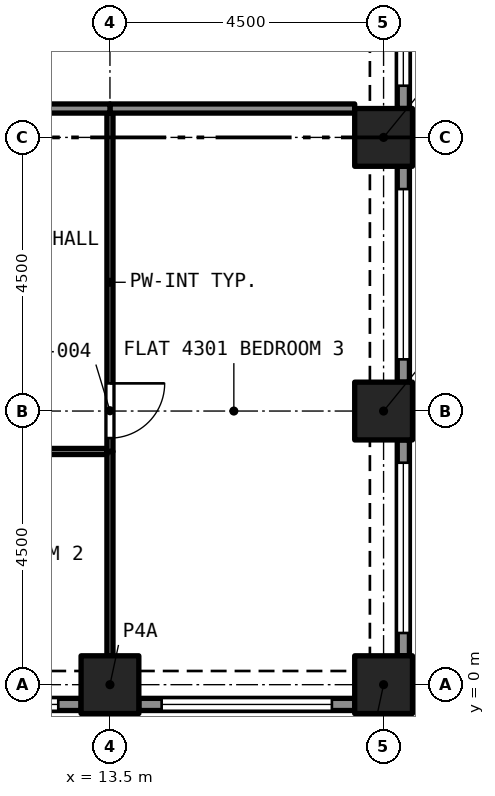
"""IFC4 building model, lengths in metres.
Left out: names, types, materials, properties, quantities, classifications, styles, units other than length and angle.
Written with IfcOpenShell. Run it as: python <this file> out.ifc"""

import sys

from ifc_helpers import new_model, si_unit, direction, frame, frame_2d, origin, origin_2d, place, context, subcontext, project, spatial, rectangle, extrude, element, fill, save


model = new_model("IFC4")
c1 = context("Model", 3, precision=1e-05, world=origin(), true_north=direction((0.0, 1.0)))
c2 = subcontext(c1, "Body", "Model", "MODEL_VIEW")
j1 = project(units=[si_unit("LENGTHUNIT", "METRE"), si_unit("PLANEANGLEUNIT", "RADIAN")], contexts=[c1])
p1 = place(None, origin())
s1 = spatial("IfcSite", under=j1, at=p1, CompositionType="ELEMENT")
p2 = place(p1, origin())
s2 = spatial("IfcBuilding", under=s1, at=p2, CompositionType="ELEMENT")
p3 = place(p2, frame((0.0, 0.0, 155.0)))
s3 = spatial("IfcBuildingStorey", under=s2, at=p3, CompositionType="ELEMENT", Elevation=155.0)
for number, where, z_axis, x_axis in (
    (1, (13.5, 0.0, 0.0), (0.0, 0.0, 1.0), (1.0, 0.0, 0.0)),
    (2, (18.0, 0.0, 0.0), (0.0, 0.0, 1.0), (1.0, 0.0, 0.0)),
    (3, (18.0, 4.5, 0.0), (0.0, 0.0, 1.0), (1.0, 0.0, 0.0)),
    (4, (18.0, 9.0, 0.0), (0.0, 0.0, 1.0), (1.0, 0.0, 0.0)),
):
    element("IfcColumn", number, at=place(p3, frame(where, z_axis=z_axis, x_axis=x_axis)), inside=s3, PredefinedType="COLUMN", context=c2, shape_type="SweptSolid", body=[
        extrude(rectangle(XDim=0.95, YDim=0.95, at=origin_2d()), origin(), (0.0, 0.0, 1.0), 4.4),
    ])
p4 = place(p3, frame((13.025, -0.325, 0.0), z_axis=(0.0, 0.0, 1.0), x_axis=(-1.0, 0.0, 0.0)))
e5 = element("IfcWall", 5, at=p4, inside=s3, PredefinedType="SOLIDWALL", context=c2, shape_type="SweptSolid", body=[
    extrude(rectangle(XDim=3.55, YDim=0.2, at=frame_2d((1.775, 0.0))), origin(), (0.0, 0.0, 1.0), 4.4),
])
p5 = place(p4, frame((0.375, 0.0, 0.45)))
e6 = element("IfcOpeningElement", 6, at=p5, cuts=e5, PredefinedType="OPENING", context=c2, shape_type="SweptSolid", body=[
    extrude(rectangle(XDim=2.8, YDim=2.55, at=frame_2d((1.4, 1.275))), frame((0.0, 0.11, 0.0), z_axis=(0.0, -1.0, 0.0), x_axis=(1.0, 0.0, 0.0)), (0.0, 0.0, 1.0), 0.22),
])
p6 = place(p3, frame((17.525, -0.325, 0.0), z_axis=(0.0, 0.0, 1.0), x_axis=(-1.0, 0.0, 0.0)))
e7 = element("IfcWall", 7, at=p6, inside=s3, PredefinedType="SOLIDWALL", context=c2, shape_type="SweptSolid", body=[
    extrude(rectangle(XDim=3.55, YDim=0.2, at=frame_2d((1.775, 0.0))), origin(), (0.0, 0.0, 1.0), 4.4),
])
p7 = place(p6, frame((0.375, 0.0, 0.45)))
e8 = element("IfcOpeningElement", 8, at=p7, cuts=e7, PredefinedType="OPENING", context=c2, shape_type="SweptSolid", body=[
    extrude(rectangle(XDim=2.8, YDim=2.55, at=frame_2d((1.4, 1.275))), frame((0.0, 0.11, 0.0), z_axis=(0.0, -1.0, 0.0), x_axis=(1.0, 0.0, 0.0)), (0.0, 0.0, 1.0), 0.22),
])
p8 = place(p3, frame((18.325, 4.025, 0.0), z_axis=(0.0, 0.0, 1.0), x_axis=(0.0, -1.0, 0.0)))
e9 = element("IfcWall", 9, at=p8, inside=s3, PredefinedType="SOLIDWALL", context=c2, shape_type="SweptSolid", body=[
    extrude(rectangle(XDim=3.55, YDim=0.2, at=frame_2d((1.775, 0.0))), origin(), (0.0, 0.0, 1.0), 4.4),
])
p9 = place(p8, frame((0.375, 0.0, 0.45)))
e10 = element("IfcOpeningElement", 10, at=p9, cuts=e9, PredefinedType="OPENING", context=c2, shape_type="SweptSolid", body=[
    extrude(rectangle(XDim=2.8, YDim=2.55, at=frame_2d((1.4, 1.275))), frame((0.0, 0.11, 0.0), z_axis=(0.0, -1.0, 0.0), x_axis=(1.0, 0.0, 0.0)), (0.0, 0.0, 1.0), 0.22),
])
p10 = place(p3, frame((18.325, 8.525, 0.0), z_axis=(0.0, 0.0, 1.0), x_axis=(0.0, -1.0, 0.0)))
e11 = element("IfcWall", 11, at=p10, inside=s3, PredefinedType="SOLIDWALL", context=c2, shape_type="SweptSolid", body=[
    extrude(rectangle(XDim=3.55, YDim=0.2, at=frame_2d((1.775, 0.0))), origin(), (0.0, 0.0, 1.0), 4.4),
])
p11 = place(p10, frame((0.375, 0.0, 0.45)))
e12 = element("IfcOpeningElement", 12, at=p11, cuts=e11, PredefinedType="OPENING", context=c2, shape_type="SweptSolid", body=[
    extrude(rectangle(XDim=2.8, YDim=2.55, at=frame_2d((1.4, 1.275))), frame((0.0, 0.11, 0.0), z_axis=(0.0, -1.0, 0.0), x_axis=(1.0, 0.0, 0.0)), (0.0, 0.0, 1.0), 0.22),
])
p12 = place(p3, frame((18.325, 13.025, 0.0), z_axis=(0.0, 0.0, 1.0), x_axis=(0.0, -1.0, 0.0)))
e13 = element("IfcWall", 13, at=p12, inside=s3, PredefinedType="SOLIDWALL", context=c2, shape_type="SweptSolid", body=[
    extrude(rectangle(XDim=3.55, YDim=0.2, at=frame_2d((1.775, 0.0))), origin(), (0.0, 0.0, 1.0), 4.4),
])
p13 = place(p12, frame((0.375, 0.0, 0.45)))
e14 = element("IfcOpeningElement", 14, at=p13, cuts=e13, PredefinedType="OPENING", context=c2, shape_type="SweptSolid", body=[
    extrude(rectangle(XDim=2.8, YDim=2.55, at=frame_2d((1.4, 1.275))), frame((0.0, 0.11, 0.0), z_axis=(0.0, -1.0, 0.0), x_axis=(1.0, 0.0, 0.0)), (0.0, 0.0, 1.0), 0.22),
])
p14 = place(p3, frame((13.5, 0.475, 0.0), z_axis=(0.0, 0.0, 1.0), x_axis=(0.0, 1.0, 0.0)))
e15 = element("IfcWall", 15, at=p14, inside=s3, PredefinedType="PARTITIONING", context=c2, shape_type="SweptSolid", body=[
    extrude(rectangle(XDim=3.36, YDim=0.1, at=frame_2d((1.68, 0.0))), origin(), (0.0, 0.0, 1.0), 4.1),
])
p15 = place(p3, frame((13.45, 3.835, 0.0), z_axis=(0.0, 0.0, 1.0), x_axis=(-1.0, 0.0, 0.0)))
e16 = element("IfcWall", 16, at=p15, inside=s3, PredefinedType="PARTITIONING", context=c2, shape_type="SweptSolid", body=[
    extrude(rectangle(XDim=4.45, YDim=0.1, at=frame_2d((2.225, 0.0))), origin(), (0.0, 0.0, 1.0), 4.1),
])
p16 = place(p15, frame((1.75, 0.0, 0.0)))
e17 = element("IfcOpeningElement", 17, at=p16, cuts=e16, PredefinedType="OPENING", context=c2, shape_type="SweptSolid", body=[
    extrude(rectangle(XDim=0.9, YDim=2.1, at=frame_2d((0.45, 1.05))), frame((0.0, 0.06, 0.0), z_axis=(0.0, -1.0, 0.0), x_axis=(1.0, 0.0, 0.0)), (0.0, 0.0, 1.0), 0.12),
])
p17 = place(p3, frame((13.5, 9.4, 0.0), z_axis=(0.0, 0.0, 1.0), x_axis=(0.0, -1.0, 0.0)))
e18 = element("IfcWall", 18, at=p17, inside=s3, PredefinedType="PARTITIONING", context=c2, shape_type="SweptSolid", body=[
    extrude(rectangle(XDim=5.565, YDim=0.1, at=frame_2d((2.782, 0.0))), origin(), (0.0, 0.0, 1.0), 4.1),
])
p18 = place(p17, frame((4.445, 0.0, 0.0)))
e19 = element("IfcOpeningElement", 19, at=p18, cuts=e18, PredefinedType="OPENING", context=c2, shape_type="SweptSolid", body=[
    extrude(rectangle(XDim=0.9, YDim=2.1, at=frame_2d((0.45, 1.05))), frame((0.0, 0.06, 0.0), z_axis=(0.0, -1.0, 0.0), x_axis=(1.0, 0.0, 0.0)), (0.0, 0.0, 1.0), 0.12),
])
p19 = place(p3, frame((13.5, 9.475, 0.0), z_axis=(0.0, 0.0, 1.0), x_axis=(1.0, 0.0, 0.0)))
e20 = element("IfcWall", 20, at=p19, inside=s3, PredefinedType="PARTITIONING", context=c2, shape_type="SweptSolid", body=[
    extrude(rectangle(XDim=4.025, YDim=0.15, at=frame_2d((2.012, 0.0))), origin(), (0.0, 0.0, 1.0), 4.1),
])
p20 = place(p3, frame((13.5, 9.475, 0.0), z_axis=(0.0, 0.0, 1.0), x_axis=(-1.0, 0.0, 0.0)))
e21 = element("IfcWall", 21, at=p20, inside=s3, PredefinedType="PARTITIONING", context=c2, shape_type="SweptSolid", body=[
    extrude(rectangle(XDim=3.05, YDim=0.15, at=frame_2d((1.525, 0.0))), origin(), (0.0, 0.0, 1.0), 4.1),
])
p21 = place(p20, frame((1.65, 0.0, 0.0)))
e22 = element("IfcOpeningElement", 22, at=p21, cuts=e21, PredefinedType="OPENING", context=c2, shape_type="SweptSolid", body=[
    extrude(rectangle(XDim=1.2, YDim=2.4, at=frame_2d((0.6, 1.2))), frame((0.0, 0.085, 0.0), z_axis=(0.0, -1.0, 0.0), x_axis=(1.0, 0.0, 0.0)), (0.0, 0.0, 1.0), 0.17),
])
p22 = place(p5, origin())
e23 = element("IfcWindow", 23, at=p22, inside=s3, PartitioningType="SINGLE_PANEL", PredefinedType="WINDOW", context=c2, shape_type="SweptSolid", body=[
    extrude(rectangle(XDim=2.8, YDim=2.55, at=frame_2d((1.4, 1.275))), frame((0.0, 0.03, 0.0), z_axis=(0.0, -1.0, 0.0), x_axis=(1.0, 0.0, 0.0)), (0.0, 0.0, 1.0), 0.06),
])
fill(e6, e23)
p23 = place(p7, origin())
e24 = element("IfcWindow", 24, at=p23, inside=s3, PartitioningType="SINGLE_PANEL", PredefinedType="WINDOW", context=c2, shape_type="SweptSolid", body=[
    extrude(rectangle(XDim=2.8, YDim=2.55, at=frame_2d((1.4, 1.275))), frame((0.0, 0.03, 0.0), z_axis=(0.0, -1.0, 0.0), x_axis=(1.0, 0.0, 0.0)), (0.0, 0.0, 1.0), 0.06),
])
fill(e8, e24)
p24 = place(p9, origin())
e25 = element("IfcWindow", 25, at=p24, inside=s3, PartitioningType="SINGLE_PANEL", PredefinedType="WINDOW", context=c2, shape_type="SweptSolid", body=[
    extrude(rectangle(XDim=2.8, YDim=2.55, at=frame_2d((1.4, 1.275))), frame((0.0, 0.03, 0.0), z_axis=(0.0, -1.0, 0.0), x_axis=(1.0, 0.0, 0.0)), (0.0, 0.0, 1.0), 0.06),
])
fill(e10, e25)
p25 = place(p11, origin())
e26 = element("IfcWindow", 26, at=p25, inside=s3, PartitioningType="SINGLE_PANEL", PredefinedType="WINDOW", context=c2, shape_type="SweptSolid", body=[
    extrude(rectangle(XDim=2.8, YDim=2.55, at=frame_2d((1.4, 1.275))), frame((0.0, 0.03, 0.0), z_axis=(0.0, -1.0, 0.0), x_axis=(1.0, 0.0, 0.0)), (0.0, 0.0, 1.0), 0.06),
])
fill(e12, e26)
p26 = place(p13, origin())
e27 = element("IfcWindow", 27, at=p26, inside=s3, PartitioningType="SINGLE_PANEL", PredefinedType="WINDOW", context=c2, shape_type="SweptSolid", body=[
    extrude(rectangle(XDim=2.8, YDim=2.55, at=frame_2d((1.4, 1.275))), frame((0.0, 0.03, 0.0), z_axis=(0.0, -1.0, 0.0), x_axis=(1.0, 0.0, 0.0)), (0.0, 0.0, 1.0), 0.06),
])
fill(e14, e27)
p27 = place(p18, origin())
e28 = element("IfcDoor", 28, at=p27, inside=s3, OperationType="SINGLE_SWING_RIGHT", PredefinedType="DOOR", context=c2, shape_type="SweptSolid", body=[
    extrude(rectangle(XDim=0.9, YDim=2.1, at=frame_2d((0.45, 1.05))), frame((0.0, 0.025, 0.0), z_axis=(0.0, -1.0, 0.0), x_axis=(1.0, 0.0, 0.0)), (0.0, 0.0, 1.0), 0.05),
])
fill(e19, e28)
save(model, sys.argv[1])
